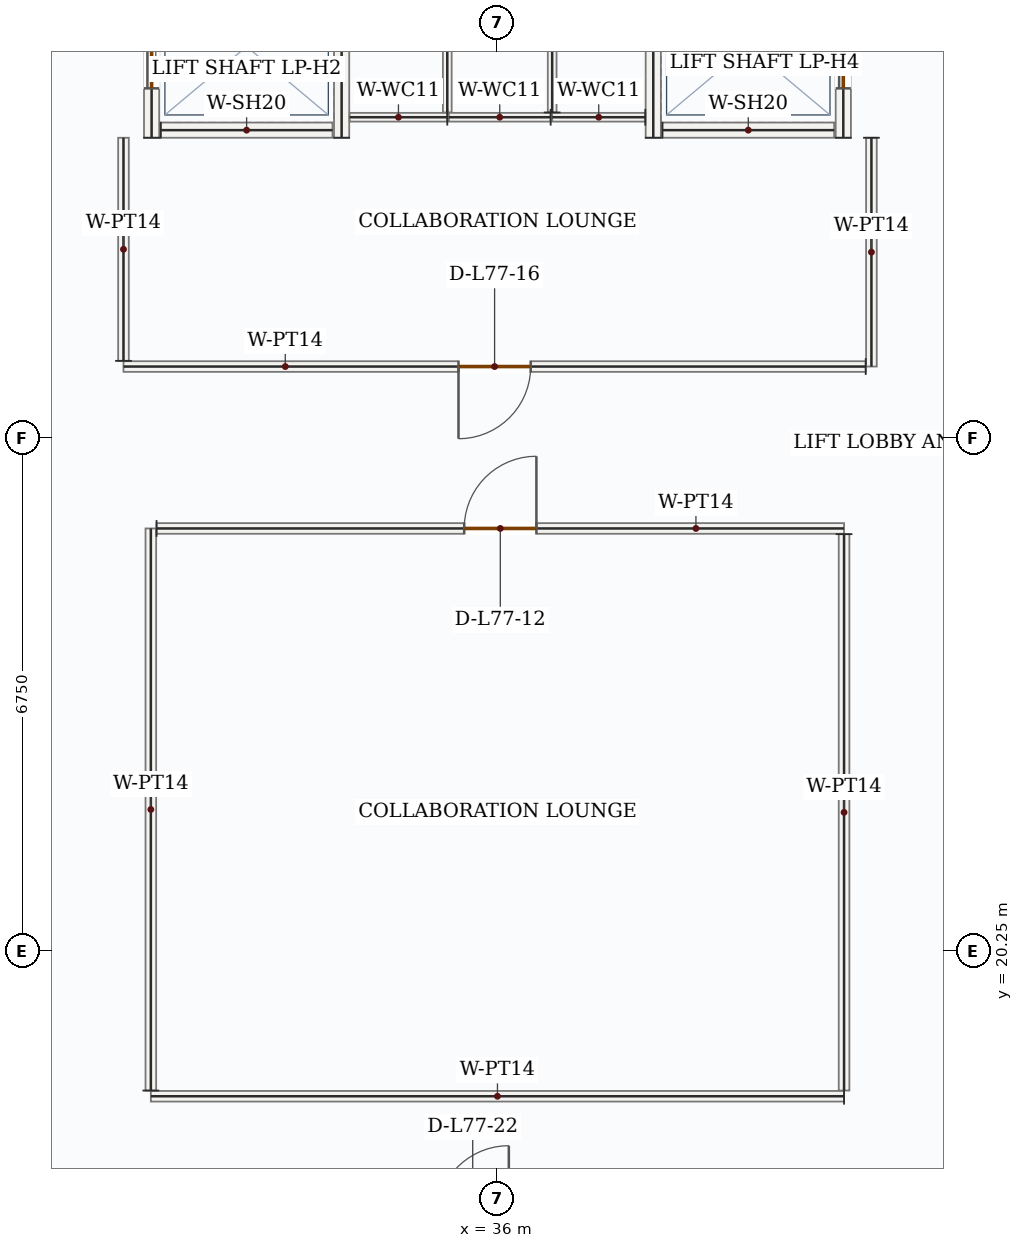
"""IFC4 building model, lengths in metres.
Left out: names, types, materials, properties, quantities, classifications, styles, units other than length and angle.
Written with IfcOpenShell. Run it as: python <this file> out.ifc"""

import sys

from ifc_helpers import new_model, si_unit, direction, frame, frame_2d, origin, place, context, subcontext, project, spatial, rectangle, extrude, source, transform, mapped, element, fill, save


model = new_model("IFC4")
c1 = context("Model", 3, precision=1e-05, world=origin(), true_north=direction((0.0, 1.0)))
c2 = subcontext(c1, "Body", "Model", "MODEL_VIEW")
j1 = project(units=[si_unit("LENGTHUNIT", "METRE"), si_unit("PLANEANGLEUNIT", "RADIAN")], contexts=[c1])
p1 = place(None, origin())
s1 = spatial("IfcSite", under=j1, at=p1, CompositionType="ELEMENT")
p2 = place(p1, origin())
s2 = spatial("IfcBuilding", under=s1, at=p2, CompositionType="ELEMENT")
p3 = place(p2, frame((0.0, 0.0, 319.8)))
s3 = spatial("IfcBuildingStorey", under=s2, at=p3, CompositionType="ELEMENT", Elevation=319.8)
p4 = place(p3, frame((31.45, 30.95, 0.0), z_axis=(0.0, 0.0, 1.0), x_axis=(0.0, 1.0, 0.0)))
e1 = element("IfcWall", 1, at=p4, inside=s3, PredefinedType="SOLIDWALL", context=c2, shape_type="SweptSolid", body=[
    extrude(rectangle(XDim=2.4, YDim=0.2, at=frame_2d((1.2, 0.0))), origin(), (0.0, 0.0, 1.0), 3.5),
])
p5 = place(p4, frame((0.65, 0.0, 0.0)))
e2 = element("IfcOpeningElement", 2, at=p5, cuts=e1, PredefinedType="OPENING", context=c2, shape_type="SweptSolid", body=[
    extrude(rectangle(XDim=1.1, YDim=2.15, at=frame_2d((0.55, 1.075))), frame((0.0, 0.11, 0.0), z_axis=(0.0, -1.0, 0.0), x_axis=(1.0, 0.0, 0.0)), (0.0, 0.0, 1.0), 0.22),
])
m1 = source(origin(), c2, "Body", "SweptSolid", [
    extrude(rectangle(XDim=2.4, YDim=0.2, at=frame_2d((1.2, 0.0))), origin(), (0.0, 0.0, 1.0), 3.5),
])
p6 = place(p3, frame((33.95, 30.95, 0.0), z_axis=(0.0, 0.0, 1.0), x_axis=(0.0, 1.0, 0.0)))
e3 = element("IfcWall", 3, at=p6, inside=s3, PredefinedType="SOLIDWALL", context=c2, shape_type="MappedRepresentation", body=[
    mapped(m1, transform((0.0, 0.0, 0.0), x_axis=(1.0, 0.0, 0.0), y_axis=(0.0, 1.0, 0.0), z_axis=(0.0, 0.0, 1.0), scale=1.0)),
])
m2 = source(origin(), c2, "Body", "SweptSolid", [
    extrude(rectangle(XDim=2.26, YDim=0.2, at=frame_2d((1.13, 0.0))), origin(), (0.0, 0.0, 1.0), 3.5),
])
p7 = place(p3, frame((31.57, 31.05, 0.0), z_axis=(0.0, 0.0, 1.0), x_axis=(1.0, 0.0, 0.0)))
e4 = element("IfcWall", 4, at=p7, inside=s3, PredefinedType="SOLIDWALL", context=c2, shape_type="MappedRepresentation", body=[
    mapped(m2, transform((0.0, 0.0, 0.0), x_axis=(1.0, 0.0, 0.0), y_axis=(0.0, 1.0, 0.0), z_axis=(0.0, 0.0, 1.0), scale=1.0)),
])
p8 = place(p3, frame((38.05, 30.95, 0.0), z_axis=(0.0, 0.0, 1.0), x_axis=(0.0, 1.0, 0.0)))
e5 = element("IfcWall", 5, at=p8, inside=s3, PredefinedType="SOLIDWALL", context=c2, shape_type="MappedRepresentation", body=[
    mapped(m1, transform((0.0, 0.0, 0.0), x_axis=(1.0, 0.0, 0.0), y_axis=(0.0, 1.0, 0.0), z_axis=(0.0, 0.0, 1.0), scale=1.0)),
])
p9 = place(p3, frame((40.55, 30.95, 0.0), z_axis=(0.0, 0.0, 1.0), x_axis=(0.0, 1.0, 0.0)))
e6 = element("IfcWall", 6, at=p9, inside=s3, PredefinedType="SOLIDWALL", context=c2, shape_type="SweptSolid", body=[
    extrude(rectangle(XDim=2.4, YDim=0.2, at=frame_2d((1.2, 0.0))), origin(), (0.0, 0.0, 1.0), 3.5),
])
p10 = place(p9, frame((0.65, 0.0, 0.0)))
e7 = element("IfcOpeningElement", 7, at=p10, cuts=e6, PredefinedType="OPENING", context=c2, shape_type="SweptSolid", body=[
    extrude(rectangle(XDim=1.1, YDim=2.15, at=frame_2d((0.55, 1.075))), frame((0.0, 0.11, 0.0), z_axis=(0.0, -1.0, 0.0), x_axis=(1.0, 0.0, 0.0)), (0.0, 0.0, 1.0), 0.22),
])
p11 = place(p3, frame((38.17, 31.05, 0.0), z_axis=(0.0, 0.0, 1.0), x_axis=(1.0, 0.0, 0.0)))
e8 = element("IfcWall", 8, at=p11, inside=s3, PredefinedType="SOLIDWALL", context=c2, shape_type="MappedRepresentation", body=[
    mapped(m2, transform((0.0, 0.0, 0.0), x_axis=(1.0, 0.0, 0.0), y_axis=(0.0, 1.0, 0.0), z_axis=(0.0, 0.0, 1.0), scale=1.0)),
])
m3 = source(origin(), c2, "Body", "SweptSolid", [
    extrude(rectangle(XDim=1.225, YDim=0.115, at=frame_2d((0.613, 0.0))), origin(), (0.0, 0.0, 1.0), 3.5),
])
p12 = place(p3, frame((37.945, 31.22, 0.0), z_axis=(0.0, 0.0, 1.0), x_axis=(-1.0, 0.0, 0.0)))
e9 = element("IfcWall", 9, at=p12, inside=s3, PredefinedType="PARTITIONING", context=c2, shape_type="MappedRepresentation", body=[
    mapped(m3, transform((0.0, 0.0, 0.0), x_axis=(1.0, 0.0, 0.0), y_axis=(0.0, 1.0, 0.0), z_axis=(0.0, 0.0, 1.0), scale=1.0)),
])
m4 = source(origin(), c2, "Body", "SweptSolid", [
    extrude(rectangle(XDim=3.998, YDim=0.115, at=frame_2d((1.999, 0.0))), origin(), (0.0, 0.0, 1.0), 3.5),
])
p13 = place(p3, frame((36.72, 31.282, 0.0), z_axis=(0.0, 0.0, 1.0), x_axis=(0.0, 1.0, 0.0)))
e10 = element("IfcWall", 10, at=p13, inside=s3, PredefinedType="PARTITIONING", context=c2, shape_type="MappedRepresentation", body=[
    mapped(m4, transform((0.0, 0.0, 0.0), x_axis=(1.0, 0.0, 0.0), y_axis=(0.0, 1.0, 0.0), z_axis=(0.0, 0.0, 1.0), scale=1.0)),
])
m5 = source(origin(), c2, "Body", "SweptSolid", [
    extrude(rectangle(XDim=1.285, YDim=0.115, at=frame_2d((0.643, 0.0))), origin(), (0.0, 0.0, 1.0), 3.5),
])
p14 = place(p3, frame((35.34, 31.22, 0.0), z_axis=(0.0, 0.0, 1.0), x_axis=(-1.0, 0.0, 0.0)))
e11 = element("IfcWall", 11, at=p14, inside=s3, PredefinedType="PARTITIONING", context=c2, shape_type="MappedRepresentation", body=[
    mapped(m5, transform((0.0, 0.0, 0.0), x_axis=(1.0, 0.0, 0.0), y_axis=(0.0, 1.0, 0.0), z_axis=(0.0, 0.0, 1.0), scale=1.0)),
])
m6 = source(origin(), c2, "Body", "SweptSolid", [
    extrude(rectangle(XDim=3.935, YDim=0.115, at=frame_2d((1.968, 0.0))), origin(), (0.0, 0.0, 1.0), 3.5),
])
p15 = place(p3, frame((35.34, 35.218, 0.0), z_axis=(0.0, 0.0, 1.0), x_axis=(0.0, -1.0, 0.0)))
e12 = element("IfcWall", 12, at=p15, inside=s3, PredefinedType="PARTITIONING", context=c2, shape_type="MappedRepresentation", body=[
    mapped(m6, transform((0.0, 0.0, 0.0), x_axis=(1.0, 0.0, 0.0), y_axis=(0.0, 1.0, 0.0), z_axis=(0.0, 0.0, 1.0), scale=1.0)),
])
m7 = source(origin(), c2, "Body", "SweptSolid", [
    extrude(rectangle(XDim=1.34, YDim=0.115, at=frame_2d((0.67, 0.0))), origin(), (0.0, 0.0, 1.0), 3.5),
])
p16 = place(p3, frame((36.7, 31.22, 0.0), z_axis=(0.0, 0.0, 1.0), x_axis=(-1.0, 0.0, 0.0)))
e13 = element("IfcWall", 13, at=p16, inside=s3, PredefinedType="PARTITIONING", context=c2, shape_type="MappedRepresentation", body=[
    mapped(m7, transform((0.0, 0.0, 0.0), x_axis=(1.0, 0.0, 0.0), y_axis=(0.0, 1.0, 0.0), z_axis=(0.0, 0.0, 1.0), scale=1.0)),
])
m8 = source(origin(), c2, "Body", "SweptSolid", [
    extrude(rectangle(XDim=3.01, YDim=0.14, at=frame_2d((1.505, 0.0))), origin(), (0.0, 0.0, 1.0), 3.5),
])
p17 = place(p3, frame((40.92, 30.95, 0.0), z_axis=(0.0, 0.0, 1.0), x_axis=(0.0, -1.0, 0.0)))
e14 = element("IfcWall", 14, at=p17, inside=s3, PredefinedType="PARTITIONING", context=c2, shape_type="MappedRepresentation", body=[
    mapped(m8, transform((0.0, 0.0, 0.0), x_axis=(1.0, 0.0, 0.0), y_axis=(0.0, 1.0, 0.0), z_axis=(0.0, 0.0, 1.0), scale=1.0)),
])
p18 = place(p3, frame((40.845, 27.94, 0.0), z_axis=(0.0, 0.0, 1.0), x_axis=(-1.0, 0.0, 0.0)))
e15 = element("IfcWall", 15, at=p18, inside=s3, PredefinedType="PARTITIONING", context=c2, shape_type="SweptSolid", body=[
    extrude(rectangle(XDim=9.765, YDim=0.14, at=frame_2d((4.882, 0.0))), origin(), (0.0, 0.0, 1.0), 3.5),
])
p19 = place(p18, frame((4.407, 0.0, 0.0)))
e16 = element("IfcOpeningElement", 16, at=p19, cuts=e15, PredefinedType="OPENING", context=c2, shape_type="SweptSolid", body=[
    extrude(rectangle(XDim=0.95, YDim=2.15, at=frame_2d((0.475, 1.075))), frame((0.0, 0.08, 0.0), z_axis=(0.0, -1.0, 0.0), x_axis=(1.0, 0.0, 0.0)), (0.0, 0.0, 1.0), 0.16),
])
m9 = source(origin(), c2, "Body", "SweptSolid", [
    extrude(rectangle(XDim=2.935, YDim=0.14, at=frame_2d((1.468, 0.0))), origin(), (0.0, 0.0, 1.0), 3.5),
])
p20 = place(p3, frame((31.08, 28.015, 0.0), z_axis=(0.0, 0.0, 1.0), x_axis=(0.0, 1.0, 0.0)))
e17 = element("IfcWall", 17, at=p20, inside=s3, PredefinedType="PARTITIONING", context=c2, shape_type="MappedRepresentation", body=[
    mapped(m9, transform((0.0, 0.0, 0.0), x_axis=(1.0, 0.0, 0.0), y_axis=(0.0, 1.0, 0.0), z_axis=(0.0, 0.0, 1.0), scale=1.0)),
])
m10 = source(origin(), c2, "Body", "SweptSolid", [
    extrude(rectangle(XDim=9.12, YDim=0.14, at=frame_2d((4.56, 0.0))), origin(), (0.0, 0.0, 1.0), 3.5),
])
p21 = place(p3, frame((40.56, 18.34, 0.0), z_axis=(0.0, 0.0, 1.0), x_axis=(-1.0, 0.0, 0.0)))
e18 = element("IfcWall", 18, at=p21, inside=s3, PredefinedType="PARTITIONING", context=c2, shape_type="MappedRepresentation", body=[
    mapped(m10, transform((0.0, 0.0, 0.0), x_axis=(1.0, 0.0, 0.0), y_axis=(0.0, 1.0, 0.0), z_axis=(0.0, 0.0, 1.0), scale=1.0)),
])
m11 = source(origin(), c2, "Body", "SweptSolid", [
    extrude(rectangle(XDim=7.395, YDim=0.14, at=frame_2d((3.698, 0.0))), origin(), (0.0, 0.0, 1.0), 3.5),
])
p22 = place(p3, frame((31.44, 18.415, 0.0), z_axis=(0.0, 0.0, 1.0), x_axis=(0.0, 1.0, 0.0)))
e19 = element("IfcWall", 19, at=p22, inside=s3, PredefinedType="PARTITIONING", context=c2, shape_type="MappedRepresentation", body=[
    mapped(m11, transform((0.0, 0.0, 0.0), x_axis=(1.0, 0.0, 0.0), y_axis=(0.0, 1.0, 0.0), z_axis=(0.0, 0.0, 1.0), scale=1.0)),
])
p23 = place(p3, frame((31.515, 25.81, 0.0), z_axis=(0.0, 0.0, 1.0), x_axis=(1.0, 0.0, 0.0)))
e20 = element("IfcWall", 20, at=p23, inside=s3, PredefinedType="PARTITIONING", context=c2, shape_type="SweptSolid", body=[
    extrude(rectangle(XDim=9.045, YDim=0.14, at=frame_2d((4.522, 0.0))), origin(), (0.0, 0.0, 1.0), 3.5),
])
p24 = place(p23, frame((4.048, 0.0, 0.0)))
e21 = element("IfcOpeningElement", 21, at=p24, cuts=e20, PredefinedType="OPENING", context=c2, shape_type="SweptSolid", body=[
    extrude(rectangle(XDim=0.95, YDim=2.15, at=frame_2d((0.475, 1.075))), frame((0.0, 0.08, 0.0), z_axis=(0.0, -1.0, 0.0), x_axis=(1.0, 0.0, 0.0)), (0.0, 0.0, 1.0), 0.16),
])
m12 = source(origin(), c2, "Body", "SweptSolid", [
    extrude(rectangle(XDim=7.32, YDim=0.14, at=frame_2d((3.66, 0.0))), origin(), (0.0, 0.0, 1.0), 3.5),
])
p25 = place(p3, frame((40.56, 25.735, 0.0), z_axis=(0.0, 0.0, 1.0), x_axis=(0.0, -1.0, 0.0)))
e22 = element("IfcWall", 22, at=p25, inside=s3, PredefinedType="PARTITIONING", context=c2, shape_type="MappedRepresentation", body=[
    mapped(m12, transform((0.0, 0.0, 0.0), x_axis=(1.0, 0.0, 0.0), y_axis=(0.0, 1.0, 0.0), z_axis=(0.0, 0.0, 1.0), scale=1.0)),
])
m13 = source(origin(), c2, "Body", "SweptSolid", [
    extrude(rectangle(XDim=1.1, YDim=2.15, at=frame_2d((0.55, 1.075))), frame((0.0, 0.025, 0.0), z_axis=(0.0, -1.0, 0.0), x_axis=(1.0, 0.0, 0.0)), (0.0, 0.0, 1.0), 0.05),
])
p26 = place(p5, origin())
e23 = element("IfcDoor", 23, at=p26, inside=s3, OperationType="DOUBLE_DOOR_SLIDING", PredefinedType="DOOR", context=c2, shape_type="MappedRepresentation", body=[
    mapped(m13, transform((0.0, 0.0, 0.0), x_axis=(1.0, 0.0, 0.0), y_axis=(0.0, 1.0, 0.0), z_axis=(0.0, 0.0, 1.0), scale=1.0)),
])
fill(e2, e23)
p27 = place(p10, origin())
e24 = element("IfcDoor", 24, at=p27, inside=s3, OperationType="DOUBLE_DOOR_SLIDING", PredefinedType="DOOR", context=c2, shape_type="MappedRepresentation", body=[
    mapped(m13, transform((0.0, 0.0, 0.0), x_axis=(1.0, 0.0, 0.0), y_axis=(0.0, 1.0, 0.0), z_axis=(0.0, 0.0, 1.0), scale=1.0)),
])
fill(e7, e24)
m14 = source(origin(), c2, "Body", "SweptSolid", [
    extrude(rectangle(XDim=0.95, YDim=2.15, at=frame_2d((0.475, 1.075))), frame((0.0, 0.025, 0.0), z_axis=(0.0, -1.0, 0.0), x_axis=(1.0, 0.0, 0.0)), (0.0, 0.0, 1.0), 0.05),
])
p28 = place(p24, origin())
e25 = element("IfcDoor", 25, at=p28, inside=s3, OperationType="SINGLE_SWING_RIGHT", PredefinedType="DOOR", context=c2, shape_type="MappedRepresentation", body=[
    mapped(m14, transform((0.0, 0.0, 0.0), x_axis=(1.0, 0.0, 0.0), y_axis=(0.0, 1.0, 0.0), z_axis=(0.0, 0.0, 1.0), scale=1.0)),
])
fill(e21, e25)
p29 = place(p19, origin())
e26 = element("IfcDoor", 26, at=p29, inside=s3, OperationType="SINGLE_SWING_RIGHT", PredefinedType="DOOR", context=c2, shape_type="MappedRepresentation", body=[
    mapped(m14, transform((0.0, 0.0, 0.0), x_axis=(1.0, 0.0, 0.0), y_axis=(0.0, 1.0, 0.0), z_axis=(0.0, 0.0, 1.0), scale=1.0)),
])
fill(e16, e26)
save(model, sys.argv[1])
